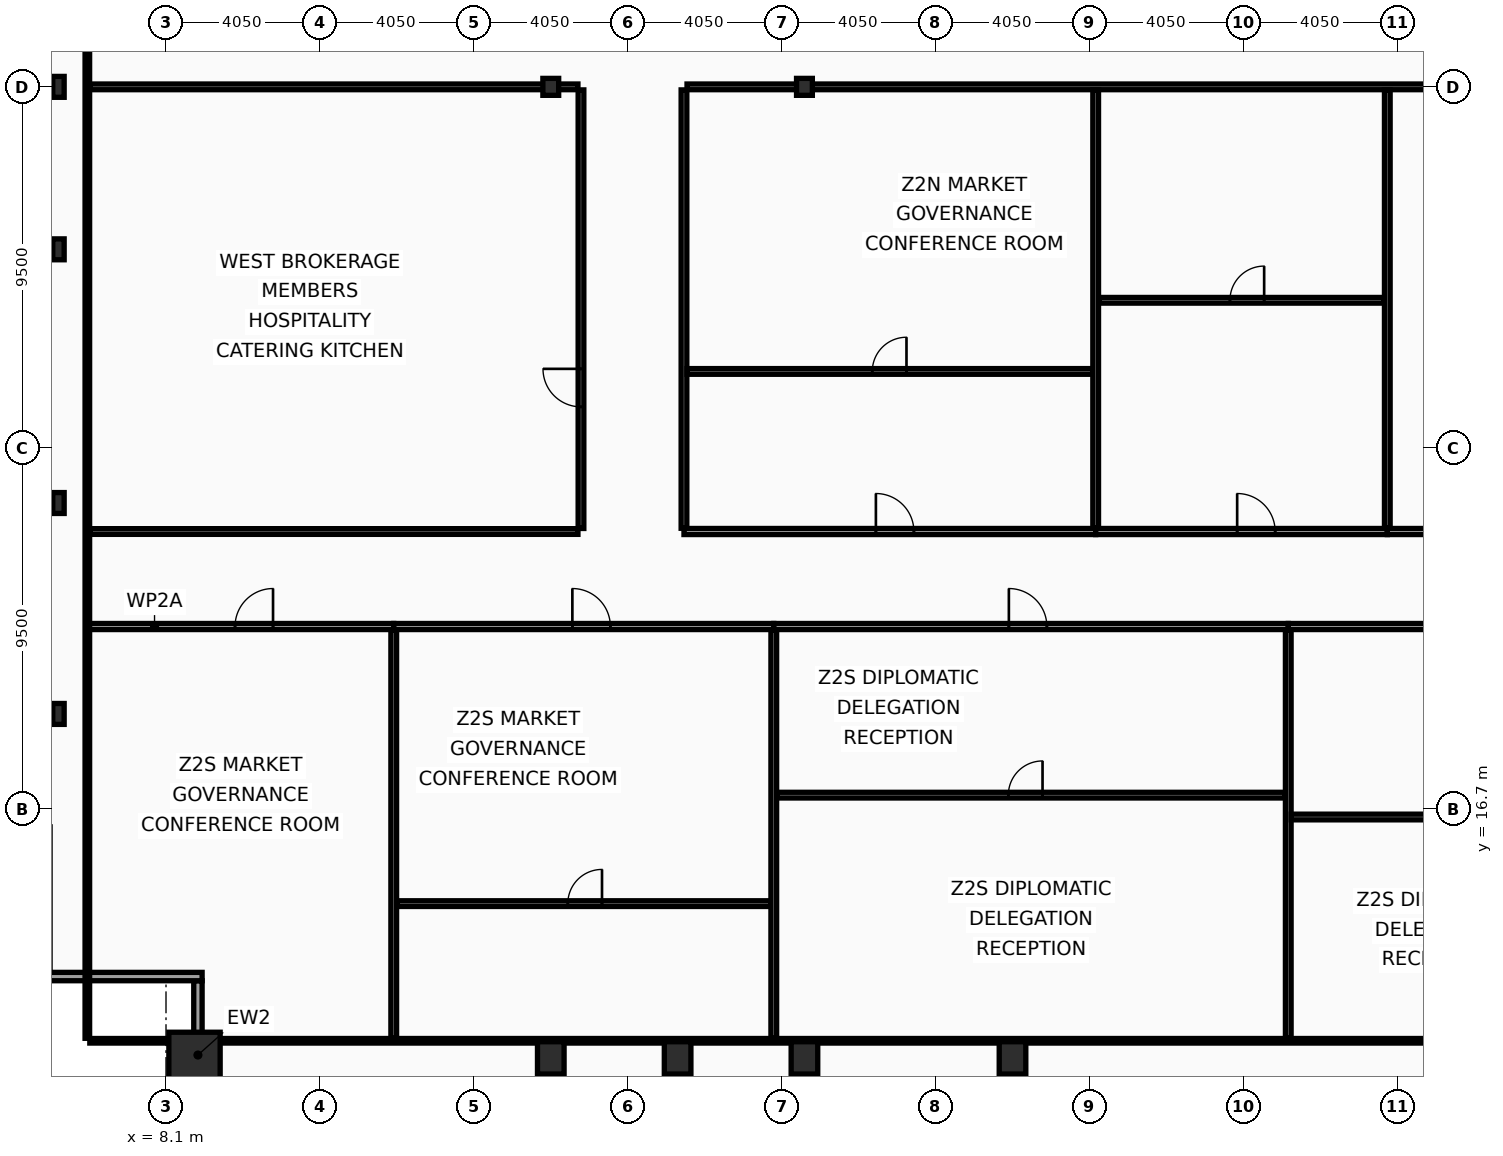
"""IFC4 building model, lengths in metres.
Left out: names, types, materials, properties, quantities, classifications, styles, units other than length and angle.
Written with IfcOpenShell. Run it as: python <this file> out.ifc"""

import sys

from ifc_helpers import new_model, si_unit, direction, frame, frame_2d, origin, origin_2d, place, context, subcontext, project, spatial, rectangle, hollow_rectangle, i_section, extrude, element, fill, save


model = new_model("IFC4")
c1 = context("Model", 3, precision=1e-05, world=origin(), true_north=direction((0.0, 1.0)))
c2 = subcontext(c1, "Body", "Model", "MODEL_VIEW")
j1 = project(units=[si_unit("LENGTHUNIT", "METRE"), si_unit("PLANEANGLEUNIT", "RADIAN")], contexts=[c1])
p1 = place(None, origin())
s1 = spatial("IfcSite", under=j1, at=p1, CompositionType="ELEMENT")
p2 = place(p1, origin())
s2 = spatial("IfcBuilding", under=s1, at=p2, CompositionType="ELEMENT")
p3 = place(p2, frame((0.0, 0.0, 165.0)))
s3 = spatial("IfcBuildingStorey", under=s2, at=p3, CompositionType="ELEMENT", Elevation=165.0)
p4 = place(p3, frame((8.85, 10.15, 0.0), z_axis=(0.0, 0.0, 1.0), x_axis=(1.0, 0.0, 0.0)))
e1 = element("IfcColumn", 1, at=p4, inside=s3, PredefinedType="COLUMN", context=c2, shape_type="SweptSolid", body=[
    extrude(hollow_rectangle(XDim=1.35, YDim=1.35, WallThickness=0.065, at=origin_2d()), origin(), (0.0, 0.0, 1.0), 3.6),
])
for number, where, z_axis, x_axis in (
    (2, (18.225, 10.15, 0.0), (0.0, 0.0, 1.0), (1.0, 0.0, 0.0)),
    (3, (21.562, 10.15, 0.0), (0.0, 0.0, 1.0), (1.0, 0.0, 0.0)),
    (4, (24.9, 10.15, 0.0), (0.0, 0.0, 1.0), (1.0, 0.0, 0.0)),
    (5, (30.375, 10.15, 0.0), (0.0, 0.0, 1.0), (1.0, 0.0, 0.0)),
):
    element("IfcColumn", number, at=place(p3, frame(where, z_axis=z_axis, x_axis=x_axis)), inside=s3, PredefinedType="COLUMN", context=c2, shape_type="SweptSolid", body=[
        extrude(hollow_rectangle(XDim=0.7, YDim=0.85, WallThickness=0.05, at=origin_2d()), origin(), (0.0, 0.0, 1.0), 3.6),
    ])
for number, where, z_axis, x_axis in (
    (6, (5.27, 19.2, 0.0), (0.0, 0.0, 1.0), (1.0, 0.0, 0.0)),
    (7, (5.27, 24.75, 0.0), (0.0, 0.0, 1.0), (1.0, 0.0, 0.0)),
    (8, (5.27, 31.425, 0.0), (0.0, 0.0, 1.0), (1.0, 0.0, 0.0)),
    (9, (5.27, 35.7, 0.0), (0.0, 0.0, 1.0), (1.0, 0.0, 0.0)),
):
    element("IfcColumn", number, at=place(p3, frame(where, z_axis=z_axis, x_axis=x_axis)), inside=s3, PredefinedType="COLUMN", context=c2, shape_type="SweptSolid", body=[
        extrude(i_section(OverallWidth=0.3, OverallDepth=0.55, WebThickness=0.015, FlangeThickness=0.029, at=origin_2d()), origin(), (0.0, 0.0, 1.0), 3.6),
    ])
for number, where, z_axis, x_axis in (
    (10, (18.225, 35.7, 0.0), (0.0, 0.0, 1.0), (1.0, 0.0, 0.0)),
    (11, (24.9, 35.7, 0.0), (0.0, 0.0, 1.0), (1.0, 0.0, 0.0)),
):
    element("IfcColumn", number, at=place(p3, frame(where, z_axis=z_axis, x_axis=x_axis)), inside=s3, PredefinedType="COLUMN", context=c2, shape_type="SweptSolid", body=[
        extrude(i_section(OverallWidth=0.416, OverallDepth=0.446, WebThickness=0.039, FlangeThickness=0.063, at=origin_2d()), origin(), (0.0, 0.0, 1.0), 3.6),
    ])
p5 = place(p3, frame((8.94, 8.27, 0.0), z_axis=(0.0, 0.0, 1.0), x_axis=(0.0, 1.0, 0.0)))
e12 = element("IfcWall", 12, at=p5, inside=s3, PredefinedType="SOLIDWALL", context=c2, shape_type="SweptSolid", body=[
    extrude(rectangle(XDim=3.91, YDim=0.22, at=frame_2d((1.955, 0.0))), origin(), (0.0, 0.0, 1.0), 2.83),
])
p6 = place(p3, frame((9.05, 12.29, 0.0), z_axis=(0.0, 0.0, 1.0), x_axis=(-1.0, 0.0, 0.0)))
e13 = element("IfcWall", 13, at=p6, inside=s3, PredefinedType="SOLIDWALL", context=c2, shape_type="SweptSolid", body=[
    extrude(rectangle(XDim=4.22, YDim=0.22, at=frame_2d((2.11, 0.0))), origin(), (0.0, 0.0, 1.0), 2.83),
])
p7 = place(p3, frame((6.03, 21.5, 0.0), z_axis=(0.0, 0.0, 1.0), x_axis=(1.0, 0.0, 0.0)))
e14 = element("IfcWall", 14, at=p7, inside=s3, PredefinedType="PARTITIONING", context=c2, shape_type="SweptSolid", body=[
    extrude(rectangle(XDim=8.063, YDim=0.16, at=frame_2d((4.031, 0.0))), origin(), (0.0, 0.0, 1.0), 3.44),
])
p8 = place(p7, frame((3.886, 0.0, 0.0)))
e15 = element("IfcOpeningElement", 15, at=p8, cuts=e14, PredefinedType="OPENING", context=c2, shape_type="SweptSolid", body=[
    extrude(rectangle(XDim=1.0, YDim=2.05, at=frame_2d((0.5, 1.025))), frame((0.0, 0.09, 0.0), z_axis=(0.0, -1.0, 0.0), x_axis=(1.0, 0.0, 0.0)), (0.0, 0.0, 1.0), 0.18),
])
p9 = place(p3, frame((14.093, 21.5, 0.0), z_axis=(0.0, 0.0, 1.0), x_axis=(1.0, 0.0, 0.0)))
e16 = element("IfcWall", 16, at=p9, inside=s3, PredefinedType="PARTITIONING", context=c2, shape_type="SweptSolid", body=[
    extrude(rectangle(XDim=10.0, YDim=0.16, at=frame_2d((5.0, 0.0))), origin(), (0.0, 0.0, 1.0), 2.73),
])
p10 = place(p9, frame((4.7, 0.0, 0.0)))
e17 = element("IfcOpeningElement", 17, at=p10, cuts=e16, PredefinedType="OPENING", context=c2, shape_type="SweptSolid", body=[
    extrude(rectangle(XDim=1.0, YDim=2.05, at=frame_2d((0.5, 1.025))), frame((0.0, 0.09, 0.0), z_axis=(0.0, -1.0, 0.0), x_axis=(1.0, 0.0, 0.0)), (0.0, 0.0, 1.0), 0.18),
])
p11 = place(p3, frame((14.093, 10.665, 0.0), z_axis=(0.0, 0.0, 1.0), x_axis=(0.0, 1.0, 0.0)))
e18 = element("IfcWall", 18, at=p11, inside=s3, PredefinedType="PARTITIONING", context=c2, shape_type="SweptSolid", body=[
    extrude(rectangle(XDim=10.75, YDim=0.15, at=frame_2d((5.375, 0.0))), origin(), (0.0, 0.0, 1.0), 2.73),
])
p12 = place(p3, frame((14.173, 14.209, 0.0), z_axis=(0.0, 0.0, 1.0), x_axis=(1.0, 0.0, 0.0)))
e19 = element("IfcWall", 19, at=p12, inside=s3, PredefinedType="PARTITIONING", context=c2, shape_type="SweptSolid", body=[
    extrude(rectangle(XDim=9.84, YDim=0.15, at=frame_2d((4.92, 0.0))), origin(), (0.0, 0.0, 1.0), 2.73),
])
p13 = place(p12, frame((4.5, 0.0, 0.0)))
e20 = element("IfcOpeningElement", 20, at=p13, cuts=e19, PredefinedType="OPENING", context=c2, shape_type="SweptSolid", body=[
    extrude(rectangle(XDim=0.9, YDim=2.05, at=frame_2d((0.45, 1.025))), frame((0.0, 0.085, 0.0), z_axis=(0.0, -1.0, 0.0), x_axis=(1.0, 0.0, 0.0)), (0.0, 0.0, 1.0), 0.17),
])
p14 = place(p3, frame((24.093, 21.5, 0.0), z_axis=(0.0, 0.0, 1.0), x_axis=(1.0, 0.0, 0.0)))
e21 = element("IfcWall", 21, at=p14, inside=s3, PredefinedType="PARTITIONING", context=c2, shape_type="SweptSolid", body=[
    extrude(rectangle(XDim=13.538, YDim=0.16, at=frame_2d((6.769, 0.0))), origin(), (0.0, 0.0, 1.0), 2.73),
])
p15 = place(p14, frame((6.186, 0.0, 0.0)))
e22 = element("IfcOpeningElement", 22, at=p15, cuts=e21, PredefinedType="OPENING", context=c2, shape_type="SweptSolid", body=[
    extrude(rectangle(XDim=1.0, YDim=2.05, at=frame_2d((0.5, 1.025))), frame((0.0, 0.09, 0.0), z_axis=(0.0, -1.0, 0.0), x_axis=(1.0, 0.0, 0.0)), (0.0, 0.0, 1.0), 0.18),
])
p16 = place(p3, frame((24.093, 10.665, 0.0), z_axis=(0.0, 0.0, 1.0), x_axis=(0.0, 1.0, 0.0)))
e23 = element("IfcWall", 23, at=p16, inside=s3, PredefinedType="PARTITIONING", context=c2, shape_type="SweptSolid", body=[
    extrude(rectangle(XDim=10.75, YDim=0.15, at=frame_2d((5.375, 0.0))), origin(), (0.0, 0.0, 1.0), 2.93),
])
p17 = place(p3, frame((24.173, 17.063, 0.0), z_axis=(0.0, 0.0, 1.0), x_axis=(1.0, 0.0, 0.0)))
e24 = element("IfcWall", 24, at=p17, inside=s3, PredefinedType="PARTITIONING", context=c2, shape_type="SweptSolid", body=[
    extrude(rectangle(XDim=13.378, YDim=0.15, at=frame_2d((6.689, 0.0))), origin(), (0.0, 0.0, 1.0), 2.73),
])
p18 = place(p17, frame((6.092, 0.0, 0.0)))
e25 = element("IfcOpeningElement", 25, at=p18, cuts=e24, PredefinedType="OPENING", context=c2, shape_type="SweptSolid", body=[
    extrude(rectangle(XDim=0.9, YDim=2.05, at=frame_2d((0.45, 1.025))), frame((0.0, 0.085, 0.0), z_axis=(0.0, -1.0, 0.0), x_axis=(1.0, 0.0, 0.0)), (0.0, 0.0, 1.0), 0.17),
])
p19 = place(p3, frame((37.631, 21.5, 0.0), z_axis=(0.0, 0.0, 1.0), x_axis=(1.0, 0.0, 0.0)))
e26 = element("IfcWall", 26, at=p19, inside=s3, PredefinedType="PARTITIONING", context=c2, shape_type="SweptSolid", body=[
    extrude(rectangle(XDim=12.0, YDim=0.16, at=frame_2d((6.0, 0.0))), origin(), (0.0, 0.0, 1.0), 2.73),
])
p20 = place(p19, frame((5.54, 0.0, 0.0)))
e27 = element("IfcOpeningElement", 27, at=p20, cuts=e26, PredefinedType="OPENING", context=c2, shape_type="SweptSolid", body=[
    extrude(rectangle(XDim=1.0, YDim=2.05, at=frame_2d((0.5, 1.025))), frame((0.0, 0.09, 0.0), z_axis=(0.0, -1.0, 0.0), x_axis=(1.0, 0.0, 0.0)), (0.0, 0.0, 1.0), 0.18),
])
p21 = place(p3, frame((37.631, 10.665, 0.0), z_axis=(0.0, 0.0, 1.0), x_axis=(0.0, 1.0, 0.0)))
e28 = element("IfcWall", 28, at=p21, inside=s3, PredefinedType="PARTITIONING", context=c2, shape_type="SweptSolid", body=[
    extrude(rectangle(XDim=10.75, YDim=0.15, at=frame_2d((5.375, 0.0))), origin(), (0.0, 0.0, 1.0), 2.93),
])
p22 = place(p3, frame((37.711, 16.488, 0.0), z_axis=(0.0, 0.0, 1.0), x_axis=(1.0, 0.0, 0.0)))
e29 = element("IfcWall", 29, at=p22, inside=s3, PredefinedType="PARTITIONING", context=c2, shape_type="SweptSolid", body=[
    extrude(rectangle(XDim=11.841, YDim=0.15, at=frame_2d((5.92, 0.0))), origin(), (0.0, 0.0, 1.0), 2.73),
])
p23 = place(p22, frame((5.4, 0.0, 0.0)))
e30 = element("IfcOpeningElement", 30, at=p23, cuts=e29, PredefinedType="OPENING", context=c2, shape_type="SweptSolid", body=[
    extrude(rectangle(XDim=0.9, YDim=2.05, at=frame_2d((0.45, 1.025))), frame((0.0, 0.085, 0.0), z_axis=(0.0, -1.0, 0.0), x_axis=(1.0, 0.0, 0.0)), (0.0, 0.0, 1.0), 0.17),
])
p24 = place(p3, frame((19.02, 24.08, 0.0), z_axis=(0.0, 0.0, 1.0), x_axis=(0.0, 1.0, 0.0)))
e31 = element("IfcWall", 31, at=p24, inside=s3, PredefinedType="PARTITIONING", context=c2, shape_type="SweptSolid", body=[
    extrude(rectangle(XDim=11.54, YDim=0.15, at=frame_2d((5.77, 0.0))), origin(), (0.0, 0.0, 1.0), 2.93),
])
p25 = place(p24, frame((3.2, 0.0, 0.0)))
e32 = element("IfcOpeningElement", 32, at=p25, cuts=e31, PredefinedType="OPENING", context=c2, shape_type="SweptSolid", body=[
    extrude(rectangle(XDim=1.0, YDim=2.05, at=frame_2d((0.5, 1.025))), frame((0.0, 0.085, 0.0), z_axis=(0.0, -1.0, 0.0), x_axis=(1.0, 0.0, 0.0)), (0.0, 0.0, 1.0), 0.17),
])
for number, where, z_axis, x_axis in (
    (33, (6.095, 24.0, 0.0), (0.0, 0.0, 1.0), (1.0, 0.0, 0.0)),
    (34, (6.095, 35.7, 0.0), (0.0, 0.0, 1.0), (1.0, 0.0, 0.0)),
):
    element("IfcWall", number, at=place(p3, frame(where, z_axis=z_axis, x_axis=x_axis)), inside=s3, PredefinedType="PARTITIONING", context=c2, shape_type="SweptSolid", body=[
        extrude(rectangle(XDim=12.845, YDim=0.15, at=frame_2d((6.422, 0.0))), origin(), (0.0, 0.0, 1.0), 2.73),
    ])
p26 = place(p3, frame((21.73, 24.085, 0.0), z_axis=(0.0, 0.0, 1.0), x_axis=(0.0, 1.0, 0.0)))
e35 = element("IfcWall", 35, at=p26, inside=s3, PredefinedType="PARTITIONING", context=c2, shape_type="SweptSolid", body=[
    extrude(rectangle(XDim=11.535, YDim=0.15, at=frame_2d((5.768, 0.0))), origin(), (0.0, 0.0, 1.0), 2.93),
])
p27 = place(p3, frame((21.81, 35.7, 0.0), z_axis=(0.0, 0.0, 1.0), x_axis=(1.0, 0.0, 0.0)))
e36 = element("IfcWall", 36, at=p27, inside=s3, PredefinedType="PARTITIONING", context=c2, shape_type="SweptSolid", body=[
    extrude(rectangle(XDim=44.995, YDim=0.15, at=frame_2d((22.498, 0.0))), origin(), (0.0, 0.0, 1.0), 2.73),
])
p28 = place(p3, frame((21.73, 24.0, 0.0), z_axis=(0.0, 0.0, 1.0), x_axis=(1.0, 0.0, 0.0)))
e37 = element("IfcWall", 37, at=p28, inside=s3, PredefinedType="PARTITIONING", context=c2, shape_type="SweptSolid", body=[
    extrude(rectangle(XDim=10.834, YDim=0.16, at=frame_2d((5.417, 0.0))), origin(), (0.0, 0.0, 1.0), 2.73),
])
p29 = place(p28, frame((5.05, 0.0, 0.0)))
e38 = element("IfcOpeningElement", 38, at=p29, cuts=e37, PredefinedType="OPENING", context=c2, shape_type="SweptSolid", body=[
    extrude(rectangle(XDim=1.0, YDim=2.05, at=frame_2d((0.5, 1.025))), frame((0.0, 0.09, 0.0), z_axis=(0.0, -1.0, 0.0), x_axis=(1.0, 0.0, 0.0)), (0.0, 0.0, 1.0), 0.18),
])
p30 = place(p3, frame((21.81, 28.212, 0.0), z_axis=(0.0, 0.0, 1.0), x_axis=(1.0, 0.0, 0.0)))
e39 = element("IfcWall", 39, at=p30, inside=s3, PredefinedType="PARTITIONING", context=c2, shape_type="SweptSolid", body=[
    extrude(rectangle(XDim=10.674, YDim=0.15, at=frame_2d((5.337, 0.0))), origin(), (0.0, 0.0, 1.0), 2.73),
])
p31 = place(p30, frame((4.875, 0.0, 0.0)))
e40 = element("IfcOpeningElement", 40, at=p31, cuts=e39, PredefinedType="OPENING", context=c2, shape_type="SweptSolid", body=[
    extrude(rectangle(XDim=0.9, YDim=2.05, at=frame_2d((0.45, 1.025))), frame((0.0, 0.085, 0.0), z_axis=(0.0, -1.0, 0.0), x_axis=(1.0, 0.0, 0.0)), (0.0, 0.0, 1.0), 0.17),
])
p32 = place(p3, frame((32.564, 24.0, 0.0), z_axis=(0.0, 0.0, 1.0), x_axis=(1.0, 0.0, 0.0)))
e41 = element("IfcWall", 41, at=p32, inside=s3, PredefinedType="PARTITIONING", context=c2, shape_type="SweptSolid", body=[
    extrude(rectangle(XDim=7.674, YDim=0.16, at=frame_2d((3.837, 0.0))), origin(), (0.0, 0.0, 1.0), 3.44),
])
p33 = place(p32, frame((3.723, 0.0, 0.0)))
e42 = element("IfcOpeningElement", 42, at=p33, cuts=e41, PredefinedType="OPENING", context=c2, shape_type="SweptSolid", body=[
    extrude(rectangle(XDim=1.0, YDim=2.05, at=frame_2d((0.5, 1.025))), frame((0.0, 0.09, 0.0), z_axis=(0.0, -1.0, 0.0), x_axis=(1.0, 0.0, 0.0)), (0.0, 0.0, 1.0), 0.18),
])
p34 = place(p3, frame((32.564, 24.085, 0.0), z_axis=(0.0, 0.0, 1.0), x_axis=(0.0, 1.0, 0.0)))
e43 = element("IfcWall", 43, at=p34, inside=s3, PredefinedType="PARTITIONING", context=c2, shape_type="SweptSolid", body=[
    extrude(rectangle(XDim=11.535, YDim=0.15, at=frame_2d((5.768, 0.0))), origin(), (0.0, 0.0, 1.0), 2.93),
])
p35 = place(p3, frame((32.644, 30.084, 0.0), z_axis=(0.0, 0.0, 1.0), x_axis=(1.0, 0.0, 0.0)))
e44 = element("IfcWall", 44, at=p35, inside=s3, PredefinedType="PARTITIONING", context=c2, shape_type="SweptSolid", body=[
    extrude(rectangle(XDim=7.514, YDim=0.15, at=frame_2d((3.757, 0.0))), origin(), (0.0, 0.0, 1.0), 2.93),
])
p36 = place(p35, frame((3.453, 0.0, 0.0)))
e45 = element("IfcOpeningElement", 45, at=p36, cuts=e44, PredefinedType="OPENING", context=c2, shape_type="SweptSolid", body=[
    extrude(rectangle(XDim=0.9, YDim=2.05, at=frame_2d((0.45, 1.025))), frame((0.0, 0.085, 0.0), z_axis=(0.0, -1.0, 0.0), x_axis=(1.0, 0.0, 0.0)), (0.0, 0.0, 1.0), 0.17),
])
p37 = place(p3, frame((40.237, 24.0, 0.0), z_axis=(0.0, 0.0, 1.0), x_axis=(1.0, 0.0, 0.0)))
e46 = element("IfcWall", 46, at=p37, inside=s3, PredefinedType="PARTITIONING", context=c2, shape_type="SweptSolid", body=[
    extrude(rectangle(XDim=8.577, YDim=0.16, at=frame_2d((4.288, 0.0))), origin(), (0.0, 0.0, 1.0), 2.73),
])
p38 = place(p37, frame((4.102, 0.0, 0.0)))
e47 = element("IfcOpeningElement", 47, at=p38, cuts=e46, PredefinedType="OPENING", context=c2, shape_type="SweptSolid", body=[
    extrude(rectangle(XDim=1.0, YDim=2.05, at=frame_2d((0.5, 1.025))), frame((0.0, 0.09, 0.0), z_axis=(0.0, -1.0, 0.0), x_axis=(1.0, 0.0, 0.0)), (0.0, 0.0, 1.0), 0.18),
])
p39 = place(p3, frame((40.237, 24.085, 0.0), z_axis=(0.0, 0.0, 1.0), x_axis=(0.0, 1.0, 0.0)))
e48 = element("IfcWall", 48, at=p39, inside=s3, PredefinedType="PARTITIONING", context=c2, shape_type="SweptSolid", body=[
    extrude(rectangle(XDim=11.535, YDim=0.15, at=frame_2d((5.768, 0.0))), origin(), (0.0, 0.0, 1.0), 2.93),
])
p40 = place(p3, frame((6.03, 10.665, 0.0), z_axis=(0.0, 0.0, 1.0), x_axis=(0.0, 1.0, 0.0)))
e49 = element("IfcWall", 49, at=p40, inside=s3, PredefinedType="PARTITIONING", context=c2, shape_type="SweptSolid", body=[
    extrude(rectangle(XDim=42.11, YDim=0.12, at=frame_2d((21.055, 0.0))), origin(), (0.0, 0.0, 1.0), 2.73),
])
p41 = place(p3, frame((6.095, 10.6, 0.0), z_axis=(0.0, 0.0, 1.0), x_axis=(1.0, 0.0, 0.0)))
e50 = element("IfcWall", 50, at=p41, inside=s3, PredefinedType="PARTITIONING", context=c2, shape_type="SweptSolid", body=[
    extrude(rectangle(XDim=60.71, YDim=0.12, at=frame_2d((30.355, 0.0))), origin(), (0.0, 0.0, 1.0), 2.73),
])
p42 = place(p8, origin())
e51 = element("IfcDoor", 51, at=p42, inside=s3, OperationType="SINGLE_SWING_RIGHT", PredefinedType="DOOR", context=c2, shape_type="SweptSolid", body=[
    extrude(rectangle(XDim=1.0, YDim=2.05, at=frame_2d((0.5, 1.025))), frame((0.0, 0.025, 0.0), z_axis=(0.0, -1.0, 0.0), x_axis=(1.0, 0.0, 0.0)), (0.0, 0.0, 1.0), 0.05),
])
fill(e15, e51)
p43 = place(p10, origin())
e52 = element("IfcDoor", 52, at=p43, inside=s3, OperationType="SINGLE_SWING_LEFT", PredefinedType="DOOR", context=c2, shape_type="SweptSolid", body=[
    extrude(rectangle(XDim=1.0, YDim=2.05, at=frame_2d((0.5, 1.025))), frame((0.0, 0.025, 0.0), z_axis=(0.0, -1.0, 0.0), x_axis=(1.0, 0.0, 0.0)), (0.0, 0.0, 1.0), 0.05),
])
fill(e17, e52)
p44 = place(p13, origin())
e53 = element("IfcDoor", 53, at=p44, inside=s3, OperationType="SINGLE_SWING_RIGHT", PredefinedType="DOOR", context=c2, shape_type="SweptSolid", body=[
    extrude(rectangle(XDim=0.9, YDim=2.05, at=frame_2d((0.45, 1.025))), frame((0.0, 0.025, 0.0), z_axis=(0.0, -1.0, 0.0), x_axis=(1.0, 0.0, 0.0)), (0.0, 0.0, 1.0), 0.05),
])
fill(e20, e53)
p45 = place(p15, origin())
e54 = element("IfcDoor", 54, at=p45, inside=s3, OperationType="SINGLE_SWING_LEFT", PredefinedType="DOOR", context=c2, shape_type="SweptSolid", body=[
    extrude(rectangle(XDim=1.0, YDim=2.05, at=frame_2d((0.5, 1.025))), frame((0.0, 0.025, 0.0), z_axis=(0.0, -1.0, 0.0), x_axis=(1.0, 0.0, 0.0)), (0.0, 0.0, 1.0), 0.05),
])
fill(e22, e54)
p46 = place(p18, origin())
e55 = element("IfcDoor", 55, at=p46, inside=s3, OperationType="SINGLE_SWING_RIGHT", PredefinedType="DOOR", context=c2, shape_type="SweptSolid", body=[
    extrude(rectangle(XDim=0.9, YDim=2.05, at=frame_2d((0.45, 1.025))), frame((0.0, 0.025, 0.0), z_axis=(0.0, -1.0, 0.0), x_axis=(1.0, 0.0, 0.0)), (0.0, 0.0, 1.0), 0.05),
])
fill(e25, e55)
p47 = place(p25, origin())
e56 = element("IfcDoor", 56, at=p47, inside=s3, OperationType="SINGLE_SWING_RIGHT", PredefinedType="DOOR", context=c2, shape_type="SweptSolid", body=[
    extrude(rectangle(XDim=1.0, YDim=2.05, at=frame_2d((0.5, 1.025))), frame((0.0, 0.025, 0.0), z_axis=(0.0, -1.0, 0.0), x_axis=(1.0, 0.0, 0.0)), (0.0, 0.0, 1.0), 0.05),
])
fill(e32, e56)
p48 = place(p29, origin())
e57 = element("IfcDoor", 57, at=p48, inside=s3, OperationType="SINGLE_SWING_LEFT", PredefinedType="DOOR", context=c2, shape_type="SweptSolid", body=[
    extrude(rectangle(XDim=1.0, YDim=2.05, at=frame_2d((0.5, 1.025))), frame((0.0, 0.025, 0.0), z_axis=(0.0, -1.0, 0.0), x_axis=(1.0, 0.0, 0.0)), (0.0, 0.0, 1.0), 0.05),
])
fill(e38, e57)
p49 = place(p31, origin())
e58 = element("IfcDoor", 58, at=p49, inside=s3, OperationType="SINGLE_SWING_RIGHT", PredefinedType="DOOR", context=c2, shape_type="SweptSolid", body=[
    extrude(rectangle(XDim=0.9, YDim=2.05, at=frame_2d((0.45, 1.025))), frame((0.0, 0.025, 0.0), z_axis=(0.0, -1.0, 0.0), x_axis=(1.0, 0.0, 0.0)), (0.0, 0.0, 1.0), 0.05),
])
fill(e40, e58)
p50 = place(p33, origin())
e59 = element("IfcDoor", 59, at=p50, inside=s3, OperationType="SINGLE_SWING_LEFT", PredefinedType="DOOR", context=c2, shape_type="SweptSolid", body=[
    extrude(rectangle(XDim=1.0, YDim=2.05, at=frame_2d((0.5, 1.025))), frame((0.0, 0.025, 0.0), z_axis=(0.0, -1.0, 0.0), x_axis=(1.0, 0.0, 0.0)), (0.0, 0.0, 1.0), 0.05),
])
fill(e42, e59)
p51 = place(p36, origin())
e60 = element("IfcDoor", 60, at=p51, inside=s3, OperationType="SINGLE_SWING_RIGHT", PredefinedType="DOOR", context=c2, shape_type="SweptSolid", body=[
    extrude(rectangle(XDim=0.9, YDim=2.05, at=frame_2d((0.45, 1.025))), frame((0.0, 0.025, 0.0), z_axis=(0.0, -1.0, 0.0), x_axis=(1.0, 0.0, 0.0)), (0.0, 0.0, 1.0), 0.05),
])
fill(e45, e60)
save(model, sys.argv[1])
